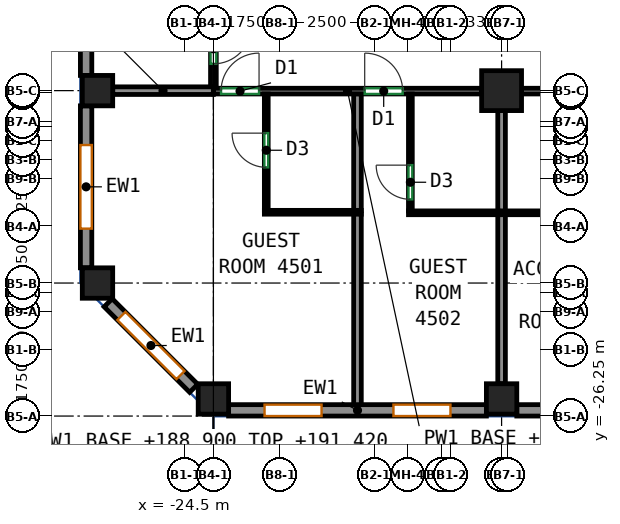
"""IFC4 building model, lengths in metres.
Left out: names, types, materials, properties, quantities, classifications, styles, units other than length and angle.
Written with IfcOpenShell. Run it as: python <this file> out.ifc"""

import sys

from ifc_helpers import new_model, si_unit, direction, frame, frame_2d, origin, origin_2d, place, context, subcontext, project, spatial, rectangle, extrude, source, transform, mapped, element, fill, save


model = new_model("IFC4")
c1 = context("Model", 3, precision=1e-05, world=origin(), true_north=direction((0.0, 1.0)))
c2 = subcontext(c1, "Body", "Model", "MODEL_VIEW")
j1 = project(units=[si_unit("LENGTHUNIT", "METRE"), si_unit("PLANEANGLEUNIT", "RADIAN")], contexts=[c1])
p1 = place(None, origin())
s1 = spatial("IfcSite", under=j1, at=p1, CompositionType="ELEMENT")
p2 = place(p1, origin())
s2 = spatial("IfcBuilding", under=s1, at=p2, CompositionType="ELEMENT")
p3 = place(p2, frame((0.0, 0.0, 188.9)))
s3 = spatial("IfcBuildingStorey", under=s2, at=p3, CompositionType="ELEMENT", Elevation=188.9)
m1 = source(origin(), c2, "Body", "SweptSolid", [
    extrude(rectangle(XDim=0.8, YDim=0.8, at=origin_2d()), origin(), (0.0, 0.0, 1.0), 3.12),
])
for number, where, z_axis, x_axis in (
    (1, (-26.8, -22.75, 0.0), (0.0, 0.0, 1.0), (1.0, 0.0, 0.0)),
    (2, (-26.8, -17.688, 0.0), (0.0, 0.0, 1.0), (1.0, 0.0, 0.0)),
    (3, (-23.75, -25.8, 0.0), (0.0, 0.0, 1.0), (1.0, 0.0, 0.0)),
    (4, (-16.167, -25.8, 0.0), (0.0, 0.0, 1.0), (1.0, 0.0, 0.0)),
):
    element("IfcColumn", number, at=place(p3, frame(where, z_axis=z_axis, x_axis=x_axis)), inside=s3, PredefinedType="COLUMN", context=c2, shape_type="MappedRepresentation", body=[
        mapped(m1, transform((0.0, 0.0, 0.0))),
    ])
m2 = source(origin(), c2, "Body", "SweptSolid", [
    extrude(rectangle(XDim=1.05, YDim=1.05, at=origin_2d()), origin(), (0.0, 0.0, 1.0), 3.12),
])
p4 = place(p3, frame((-16.167, -17.688, 0.0), z_axis=(0.0, 0.0, 1.0), x_axis=(1.0, 0.0, 0.0)))
e5 = element("IfcColumn", 5, at=p4, inside=s3, PredefinedType="COLUMN", context=c2, shape_type="MappedRepresentation", body=[
    mapped(m2, transform((0.0, 0.0, 0.0))),
])
m3 = source(origin(), c2, "Body", "SweptSolid", [
    extrude(rectangle(XDim=6.783, YDim=0.3, at=frame_2d((3.392, 0.0))), origin(), (0.0, 0.0, 1.0), 3.12),
])
p5 = place(p3, frame((-23.35, -26.1, 0.0), z_axis=(0.0, 0.0, 1.0), x_axis=(1.0, 0.0, 0.0)))
e6 = element("IfcWall", 6, at=p5, inside=s3, PredefinedType="SOLIDWALL", context=c2, shape_type="MappedRepresentation", body=[
    mapped(m3, transform((0.0, 0.0, 0.0))),
])
p6 = place(p5, frame((0.946, 0.0, 0.85)))
e7 = element("IfcOpeningElement", 7, at=p6, cuts=e6, PredefinedType="OPENING", context=c2, shape_type="SweptSolid", body=[
    extrude(rectangle(XDim=1.5, YDim=1.95, at=frame_2d((0.75, 0.975))), frame((0.0, 0.16, 0.0), z_axis=(0.0, -1.0, 0.0), x_axis=(1.0, 0.0, 0.0)), (0.0, 0.0, 1.0), 0.32),
])
p7 = place(p5, frame((4.337, 0.0, 0.85)))
e8 = element("IfcOpeningElement", 8, at=p7, cuts=e6, PredefinedType="OPENING", context=c2, shape_type="SweptSolid", body=[
    extrude(rectangle(XDim=1.5, YDim=1.95, at=frame_2d((0.75, 0.975))), frame((0.0, 0.16, 0.0), z_axis=(0.0, -1.0, 0.0), x_axis=(1.0, 0.0, 0.0)), (0.0, 0.0, 1.0), 0.32),
])
m4 = source(origin(), c2, "Body", "SweptSolid", [
    extrude(rectangle(XDim=6.783, YDim=0.3, at=frame_2d((3.392, 0.0))), origin(), (0.0, 0.0, 1.0), 3.12),
])
p8 = place(p3, frame((-15.767, -26.1, 0.0), z_axis=(0.0, 0.0, 1.0), x_axis=(1.0, 0.0, 0.0)))
e9 = element("IfcWall", 9, at=p8, inside=s3, PredefinedType="SOLIDWALL", context=c2, shape_type="MappedRepresentation", body=[
    mapped(m4, transform((0.0, 0.0, 0.0))),
])
p9 = place(p8, frame((0.946, 0.0, 0.85)))
e10 = element("IfcOpeningElement", 10, at=p9, cuts=e9, PredefinedType="OPENING", context=c2, shape_type="SweptSolid", body=[
    extrude(rectangle(XDim=1.5, YDim=1.95, at=frame_2d((0.75, 0.975))), frame((0.0, 0.16, 0.0), z_axis=(0.0, -1.0, 0.0), x_axis=(1.0, 0.0, 0.0)), (0.0, 0.0, 1.0), 0.32),
])
p10 = place(p8, frame((4.338, 0.0, 0.85)))
e11 = element("IfcOpeningElement", 11, at=p10, cuts=e9, PredefinedType="OPENING", context=c2, shape_type="SweptSolid", body=[
    extrude(rectangle(XDim=1.5, YDim=1.95, at=frame_2d((0.75, 0.975))), frame((0.0, 0.16, 0.0), z_axis=(0.0, -1.0, 0.0), x_axis=(1.0, 0.0, 0.0)), (0.0, 0.0, 1.0), 0.32),
])
m5 = source(origin(), c2, "Body", "SweptSolid", [
    extrude(rectangle(XDim=7.763, YDim=0.3, at=frame_2d((3.881, 0.0))), origin(), (0.0, 0.0, 1.0), 3.12),
])
p11 = place(p3, frame((-27.1, -9.525, 0.0), z_axis=(0.0, 0.0, 1.0), x_axis=(0.0, -1.0, 0.0)))
e12 = element("IfcWall", 12, at=p11, inside=s3, PredefinedType="SOLIDWALL", context=c2, shape_type="MappedRepresentation", body=[
    mapped(m5, transform((0.0, 0.0, 0.0))),
])
p12 = place(p11, frame((0.841, 0.0, 0.85)))
e13 = element("IfcOpeningElement", 13, at=p12, cuts=e12, PredefinedType="OPENING", context=c2, shape_type="SweptSolid", body=[
    extrude(rectangle(XDim=2.2, YDim=1.95, at=frame_2d((1.1, 0.975))), frame((0.0, 0.16, 0.0), z_axis=(0.0, -1.0, 0.0), x_axis=(1.0, 0.0, 0.0)), (0.0, 0.0, 1.0), 0.32),
])
p13 = place(p11, frame((4.722, 0.0, 0.85)))
e14 = element("IfcOpeningElement", 14, at=p13, cuts=e12, PredefinedType="OPENING", context=c2, shape_type="SweptSolid", body=[
    extrude(rectangle(XDim=2.2, YDim=1.95, at=frame_2d((1.1, 0.975))), frame((0.0, 0.16, 0.0), z_axis=(0.0, -1.0, 0.0), x_axis=(1.0, 0.0, 0.0)), (0.0, 0.0, 1.0), 0.32),
])
m6 = source(origin(), c2, "Body", "SweptSolid", [
    extrude(rectangle(XDim=4.263, YDim=0.3, at=frame_2d((2.131, 0.0))), origin(), (0.0, 0.0, 1.0), 3.12),
])
p14 = place(p3, frame((-27.1, -18.087, 0.0), z_axis=(0.0, 0.0, 1.0), x_axis=(0.0, -1.0, 0.0)))
e15 = element("IfcWall", 15, at=p14, inside=s3, PredefinedType="SOLIDWALL", context=c2, shape_type="MappedRepresentation", body=[
    mapped(m6, transform((0.0, 0.0, 0.0))),
])
p15 = place(p14, frame((1.031, 0.0, 0.85)))
e16 = element("IfcOpeningElement", 16, at=p15, cuts=e15, PredefinedType="OPENING", context=c2, shape_type="SweptSolid", body=[
    extrude(rectangle(XDim=2.2, YDim=1.95, at=frame_2d((1.1, 0.975))), frame((0.0, 0.16, 0.0), z_axis=(0.0, -1.0, 0.0), x_axis=(1.0, 0.0, 0.0)), (0.0, 0.0, 1.0), 0.32),
])
m7 = source(origin(), c2, "Body", "SweptSolid", [
    extrude(rectangle(XDim=3.182, YDim=0.3, at=frame_2d((1.591, 0.0))), origin(), (0.0, 0.0, 1.0), 3.12),
])
p16 = place(p3, frame((-26.519, -23.269, 0.0), z_axis=(0.0, 0.0, 1.0), x_axis=(0.707068419229, -0.707145141063, 0.0)))
e17 = element("IfcWall", 17, at=p16, inside=s3, PredefinedType="SOLIDWALL", context=c2, shape_type="MappedRepresentation", body=[
    mapped(m7, transform((0.0, 0.0, 0.0))),
])
p17 = place(p16, frame((0.491, 0.0, 0.85)))
e18 = element("IfcOpeningElement", 18, at=p17, cuts=e17, PredefinedType="OPENING", context=c2, shape_type="SweptSolid", body=[
    extrude(rectangle(XDim=2.2, YDim=1.95, at=frame_2d((1.1, 0.975))), frame((0.0, 0.16, 0.0), z_axis=(0.0, -1.0, 0.0), x_axis=(1.0, 0.0, 0.0)), (0.0, 0.0, 1.0), 0.32),
])
p18 = place(p3, frame((-23.75, -17.7, 0.0), z_axis=(0.0, 0.0, 1.0), x_axis=(1.0, 0.0, 0.0)))
e19 = element("IfcWall", 19, at=p18, inside=s3, PredefinedType="PARTITIONING", context=c2, shape_type="SweptSolid", body=[
    extrude(rectangle(XDim=7.058, YDim=0.15, at=frame_2d((3.529, 0.0))), origin(), (0.0, 0.0, 1.0), 2.52),
])
p19 = place(p18, frame((0.201, 0.0, 0.0)))
e20 = element("IfcOpeningElement", 20, at=p19, cuts=e19, PredefinedType="OPENING", context=c2, shape_type="SweptSolid", body=[
    extrude(rectangle(XDim=1.0, YDim=2.1, at=frame_2d((0.5, 1.05))), frame((0.0, 0.085, 0.0), z_axis=(0.0, -1.0, 0.0), x_axis=(1.0, 0.0, 0.0)), (0.0, 0.0, 1.0), 0.17),
])
p20 = place(p18, frame((3.981, 0.0, 0.0)))
e21 = element("IfcOpeningElement", 21, at=p20, cuts=e19, PredefinedType="OPENING", context=c2, shape_type="SweptSolid", body=[
    extrude(rectangle(XDim=1.0, YDim=2.1, at=frame_2d((0.5, 1.05))), frame((0.0, 0.085, 0.0), z_axis=(0.0, -1.0, 0.0), x_axis=(1.0, 0.0, 0.0)), (0.0, 0.0, 1.0), 0.17),
])
p21 = place(p3, frame((-15.642, -17.7, 0.0), z_axis=(0.0, 0.0, 1.0), x_axis=(1.0, 0.0, 0.0)))
e22 = element("IfcWall", 22, at=p21, inside=s3, PredefinedType="PARTITIONING", context=c2, shape_type="SweptSolid", body=[
    extrude(rectangle(XDim=6.534, YDim=0.15, at=frame_2d((3.267, 0.0))), origin(), (0.0, 0.0, 1.0), 3.12),
])
p22 = place(p21, frame((2.077, 0.0, 0.0)))
e23 = element("IfcOpeningElement", 23, at=p22, cuts=e22, PredefinedType="OPENING", context=c2, shape_type="SweptSolid", body=[
    extrude(rectangle(XDim=1.0, YDim=2.1, at=frame_2d((0.5, 1.05))), frame((0.0, 0.085, 0.0), z_axis=(0.0, -1.0, 0.0), x_axis=(1.0, 0.0, 0.0)), (0.0, 0.0, 1.0), 0.17),
])
p23 = place(p21, frame((4.291, 0.0, 0.0)))
e24 = element("IfcOpeningElement", 24, at=p23, cuts=e22, PredefinedType="OPENING", context=c2, shape_type="SweptSolid", body=[
    extrude(rectangle(XDim=1.0, YDim=2.1, at=frame_2d((0.5, 1.05))), frame((0.0, 0.085, 0.0), z_axis=(0.0, -1.0, 0.0), x_axis=(1.0, 0.0, 0.0)), (0.0, 0.0, 1.0), 0.17),
])
p24 = place(p3, frame((-23.75, -15.575, 0.0), z_axis=(0.0, 0.0, 1.0), x_axis=(0.0, -1.0, 0.0)))
e25 = element("IfcWall", 25, at=p24, inside=s3, PredefinedType="PARTITIONING", context=c2, shape_type="SweptSolid", body=[
    extrude(rectangle(XDim=2.023, YDim=0.15, at=frame_2d((1.011, 0.0))), origin(), (0.0, 0.0, 1.0), 2.52),
])
p25 = place(p24, frame((0.408, 0.0, 0.0)))
e26 = element("IfcOpeningElement", 26, at=p25, cuts=e25, PredefinedType="OPENING", context=c2, shape_type="SweptSolid", body=[
    extrude(rectangle(XDim=1.0, YDim=2.1, at=frame_2d((0.5, 1.05))), frame((0.0, 0.085, 0.0), z_axis=(0.0, -1.0, 0.0), x_axis=(1.0, 0.0, 0.0)), (0.0, 0.0, 1.0), 0.17),
])
p26 = place(p3, frame((-22.359, -20.838, 0.0), z_axis=(0.0, 0.0, 1.0), x_axis=(0.0, 1.0, 0.0)))
e27 = element("IfcWall", 27, at=p26, inside=s3, PredefinedType="PARTITIONING", context=c2, shape_type="SweptSolid", body=[
    extrude(rectangle(XDim=3.061, YDim=0.1, at=frame_2d((1.53, 0.0))), origin(), (0.0, 0.0, 1.0), 3.12),
])
p27 = place(p26, frame((1.132, 0.0, 0.0)))
e28 = element("IfcOpeningElement", 28, at=p27, cuts=e27, PredefinedType="OPENING", context=c2, shape_type="SweptSolid", body=[
    extrude(rectangle(XDim=0.9, YDim=2.1, at=frame_2d((0.45, 1.05))), frame((0.0, 0.06, 0.0), z_axis=(0.0, -1.0, 0.0), x_axis=(1.0, 0.0, 0.0)), (0.0, 0.0, 1.0), 0.12),
])
p28 = place(p3, frame((-22.409, -20.888, 0.0), z_axis=(0.0, 0.0, 1.0), x_axis=(1.0, 0.0, 0.0)))
e29 = element("IfcWall", 29, at=p28, inside=s3, PredefinedType="PARTITIONING", context=c2, shape_type="SweptSolid", body=[
    extrude(rectangle(XDim=2.55, YDim=0.1, at=frame_2d((1.275, 0.0))), origin(), (0.0, 0.0, 1.0), 3.12),
])
p29 = place(p3, frame((-19.959, -26.0, 0.0), z_axis=(0.0, 0.0, 1.0), x_axis=(0.0, 1.0, 0.0)))
e30 = element("IfcWall", 30, at=p29, inside=s3, PredefinedType="PARTITIONING", context=c2, shape_type="SweptSolid", body=[
    extrude(rectangle(XDim=5.062, YDim=0.2, at=frame_2d((2.531, 0.0))), origin(), (0.0, 0.0, 1.0), 3.12),
])
p30 = place(p3, frame((-26.4, -17.688, 0.0), z_axis=(0.0, 0.0, 1.0), x_axis=(1.0, 0.0, 0.0)))
e31 = element("IfcWall", 31, at=p30, inside=s3, PredefinedType="PARTITIONING", context=c2, shape_type="SweptSolid", body=[
    extrude(rectangle(XDim=2.648, YDim=0.2, at=frame_2d((1.324, 0.0))), origin(), (0.0, 0.0, 1.0), 2.52),
])
p31 = place(p3, frame((-19.959, -20.838, 0.0), z_axis=(0.0, 0.0, 1.0), x_axis=(0.0, 1.0, 0.0)))
e32 = element("IfcWall", 32, at=p31, inside=s3, PredefinedType="PARTITIONING", context=c2, shape_type="SweptSolid", body=[
    extrude(rectangle(XDim=3.061, YDim=0.2, at=frame_2d((1.53, 0.0))), origin(), (0.0, 0.0, 1.0), 3.12),
])
p32 = place(p3, frame((-18.567, -20.852, 0.0), z_axis=(0.0, 0.0, 1.0), x_axis=(0.0, 1.0, 0.0)))
e33 = element("IfcWall", 33, at=p32, inside=s3, PredefinedType="PARTITIONING", context=c2, shape_type="SweptSolid", body=[
    extrude(rectangle(XDim=3.075, YDim=0.1, at=frame_2d((1.538, 0.0))), origin(), (0.0, 0.0, 1.0), 3.12),
])
p33 = place(p32, frame((0.304, 0.0, 0.0)))
e34 = element("IfcOpeningElement", 34, at=p33, cuts=e33, PredefinedType="OPENING", context=c2, shape_type="SweptSolid", body=[
    extrude(rectangle(XDim=0.9, YDim=2.1, at=frame_2d((0.45, 1.05))), frame((0.0, 0.06, 0.0), z_axis=(0.0, -1.0, 0.0), x_axis=(1.0, 0.0, 0.0)), (0.0, 0.0, 1.0), 0.12),
])
p34 = place(p3, frame((-18.617, -20.902, 0.0), z_axis=(0.0, 0.0, 1.0), x_axis=(1.0, 0.0, 0.0)))
e35 = element("IfcWall", 35, at=p34, inside=s3, PredefinedType="PARTITIONING", context=c2, shape_type="SweptSolid", body=[
    extrude(rectangle(XDim=4.9, YDim=0.1, at=frame_2d((2.45, 0.0))), origin(), (0.0, 0.0, 1.0), 3.12),
])
p35 = place(p3, frame((-16.167, -25.4, 0.0), z_axis=(0.0, 0.0, 1.0), x_axis=(0.0, 1.0, 0.0)))
e36 = element("IfcWall", 36, at=p35, inside=s3, PredefinedType="PARTITIONING", context=c2, shape_type="SweptSolid", body=[
    extrude(rectangle(XDim=4.448, YDim=0.2, at=frame_2d((2.224, 0.0))), origin(), (0.0, 0.0, 1.0), 3.12),
])
p36 = place(p3, frame((-16.167, -20.852, 0.0), z_axis=(0.0, 0.0, 1.0), x_axis=(0.0, 1.0, 0.0)))
e37 = element("IfcWall", 37, at=p36, inside=s3, PredefinedType="PARTITIONING", context=c2, shape_type="SweptSolid", body=[
    extrude(rectangle(XDim=2.64, YDim=0.2, at=frame_2d((1.32, 0.0))), origin(), (0.0, 0.0, 1.0), 3.12),
])
p37 = place(p6, origin())
e38 = element("IfcWindow", 38, at=p37, inside=s3, PartitioningType="SINGLE_PANEL", PredefinedType="WINDOW", context=c2, shape_type="SweptSolid", body=[
    extrude(rectangle(XDim=1.5, YDim=1.95, at=frame_2d((0.75, 0.975))), frame((0.0, 0.03, 0.0), z_axis=(0.0, -1.0, 0.0), x_axis=(1.0, 0.0, 0.0)), (0.0, 0.0, 1.0), 0.06),
])
fill(e7, e38)
p38 = place(p7, origin())
e39 = element("IfcWindow", 39, at=p38, inside=s3, PartitioningType="SINGLE_PANEL", PredefinedType="WINDOW", context=c2, shape_type="SweptSolid", body=[
    extrude(rectangle(XDim=1.5, YDim=1.95, at=frame_2d((0.75, 0.975))), frame((0.0, 0.03, 0.0), z_axis=(0.0, -1.0, 0.0), x_axis=(1.0, 0.0, 0.0)), (0.0, 0.0, 1.0), 0.06),
])
fill(e8, e39)
p39 = place(p15, origin())
e40 = element("IfcWindow", 40, at=p39, inside=s3, PartitioningType="SINGLE_PANEL", PredefinedType="WINDOW", context=c2, shape_type="SweptSolid", body=[
    extrude(rectangle(XDim=2.2, YDim=1.95, at=frame_2d((1.1, 0.975))), frame((0.0, 0.03, 0.0), z_axis=(0.0, -1.0, 0.0), x_axis=(1.0, 0.0, 0.0)), (0.0, 0.0, 1.0), 0.06),
])
fill(e16, e40)
p40 = place(p17, origin())
e41 = element("IfcWindow", 41, at=p40, inside=s3, PartitioningType="SINGLE_PANEL", PredefinedType="WINDOW", context=c2, shape_type="SweptSolid", body=[
    extrude(rectangle(XDim=2.2, YDim=1.95, at=frame_2d((1.1, 0.975))), frame((0.0, 0.03, 0.0), z_axis=(0.0, -1.0, 0.0), x_axis=(1.0, 0.0, 0.0)), (0.0, 0.0, 1.0), 0.06),
])
fill(e18, e41)
p41 = place(p33, origin())
e42 = element("IfcDoor", 42, at=p41, inside=s3, OperationType="SINGLE_SWING_RIGHT", PredefinedType="DOOR", context=c2, shape_type="SweptSolid", body=[
    extrude(rectangle(XDim=0.9, YDim=2.1, at=frame_2d((0.45, 1.05))), frame((0.0, 0.025, 0.0), z_axis=(0.0, -1.0, 0.0), x_axis=(1.0, 0.0, 0.0)), (0.0, 0.0, 1.0), 0.05),
])
fill(e34, e42)
p42 = place(p27, origin())
e43 = element("IfcDoor", 43, at=p42, inside=s3, OperationType="SINGLE_SWING_RIGHT", PredefinedType="DOOR", context=c2, shape_type="SweptSolid", body=[
    extrude(rectangle(XDim=0.9, YDim=2.1, at=frame_2d((0.45, 1.05))), frame((0.0, 0.025, 0.0), z_axis=(0.0, -1.0, 0.0), x_axis=(1.0, 0.0, 0.0)), (0.0, 0.0, 1.0), 0.05),
])
fill(e28, e43)
p43 = place(p19, origin())
e44 = element("IfcDoor", 44, at=p43, inside=s3, OperationType="SINGLE_SWING_RIGHT", PredefinedType="DOOR", context=c2, shape_type="SweptSolid", body=[
    extrude(rectangle(XDim=1.0, YDim=2.1, at=frame_2d((0.5, 1.05))), frame((0.0, 0.025, 0.0), z_axis=(0.0, -1.0, 0.0), x_axis=(1.0, 0.0, 0.0)), (0.0, 0.0, 1.0), 0.05),
])
fill(e20, e44)
p44 = place(p20, origin())
e45 = element("IfcDoor", 45, at=p44, inside=s3, OperationType="SINGLE_SWING_LEFT", PredefinedType="DOOR", context=c2, shape_type="SweptSolid", body=[
    extrude(rectangle(XDim=1.0, YDim=2.1, at=frame_2d((0.5, 1.05))), frame((0.0, 0.025, 0.0), z_axis=(0.0, -1.0, 0.0), x_axis=(1.0, 0.0, 0.0)), (0.0, 0.0, 1.0), 0.05),
])
fill(e21, e45)
p45 = place(p25, origin())
e46 = element("IfcDoor", 46, at=p45, inside=s3, OperationType="SINGLE_SWING_LEFT", PredefinedType="DOOR", context=c2, shape_type="SweptSolid", body=[
    extrude(rectangle(XDim=1.0, YDim=2.1, at=frame_2d((0.5, 1.05))), frame((0.0, 0.025, 0.0), z_axis=(0.0, -1.0, 0.0), x_axis=(1.0, 0.0, 0.0)), (0.0, 0.0, 1.0), 0.05),
])
fill(e26, e46)
save(model, sys.argv[1])
